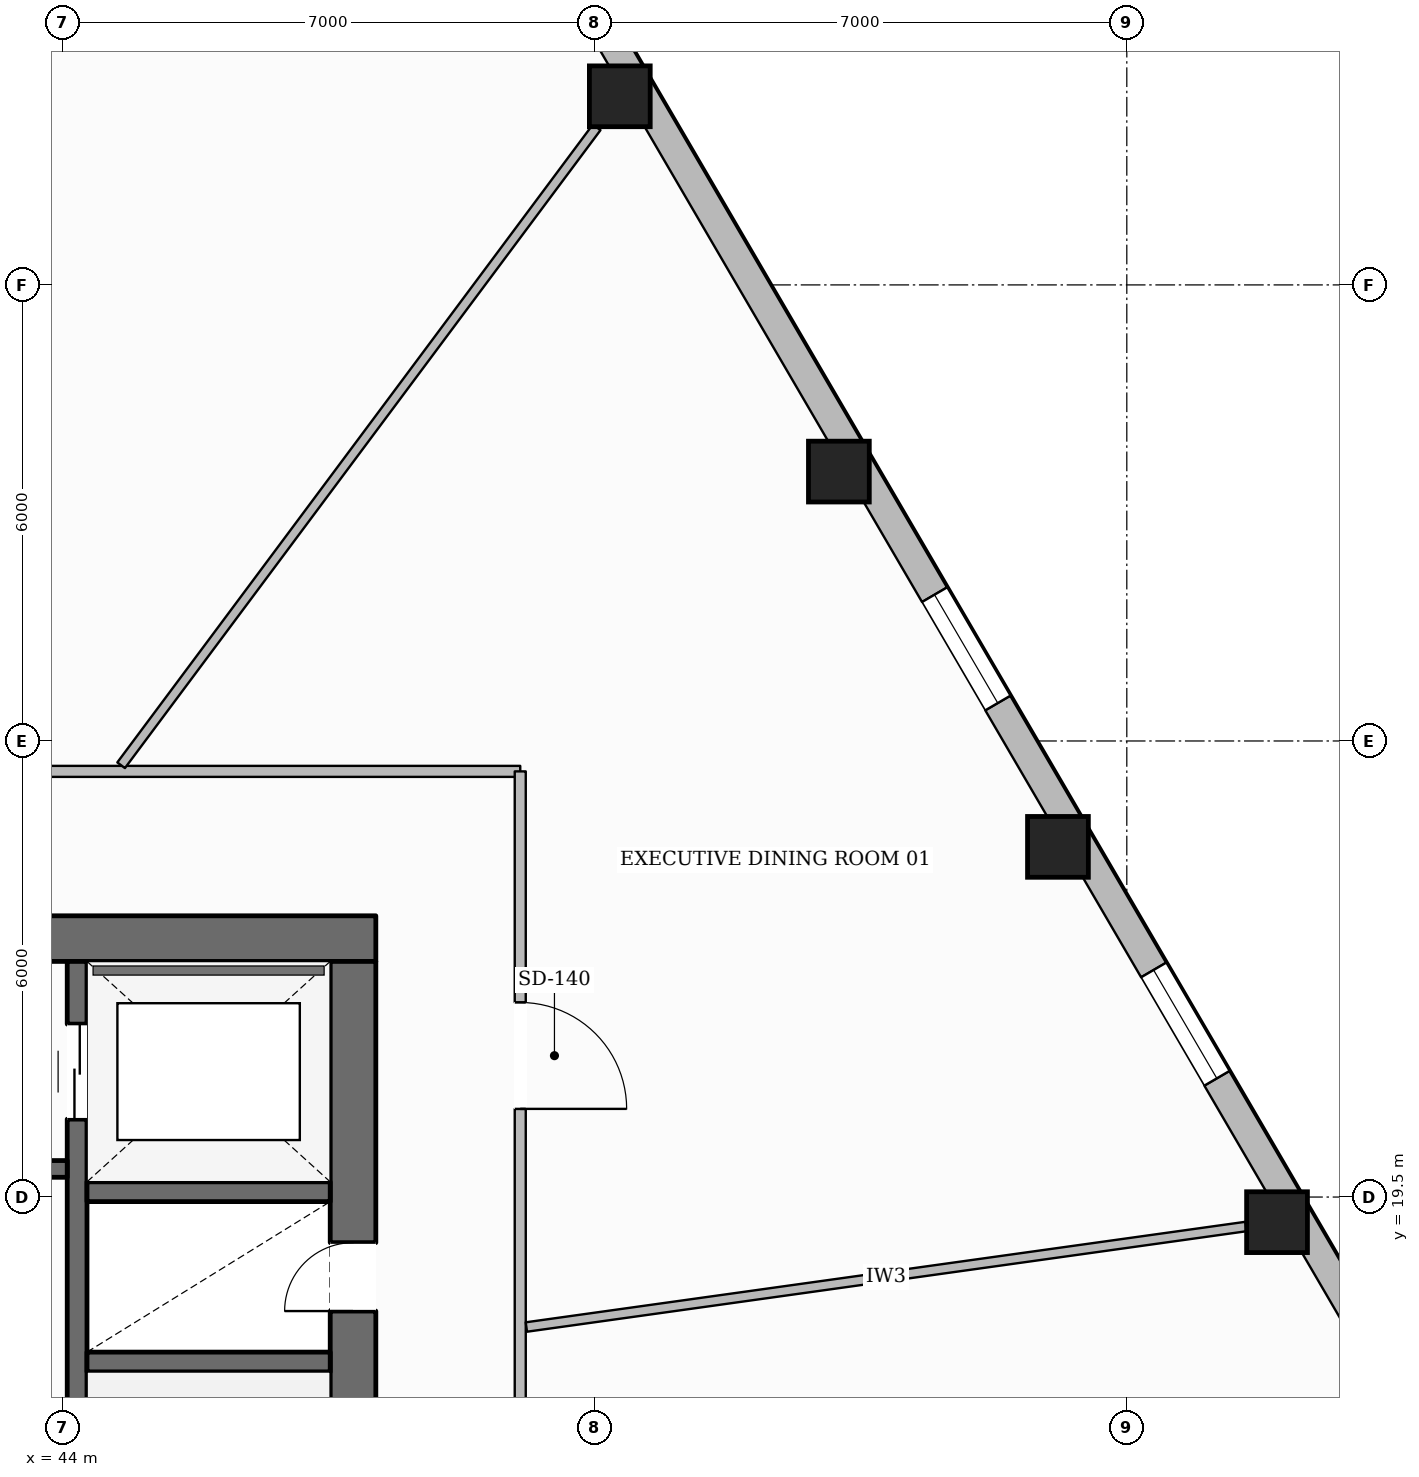
"""IFC4 building model, lengths in metres.
Left out: names, types, materials, properties, quantities, classifications, styles, units other than length and angle.
Written with IfcOpenShell. Run it as: python <this file> out.ifc"""

import sys

from ifc_helpers import new_model, si_unit, direction, frame, frame_2d, origin, origin_2d, place, context, subcontext, project, spatial, rectangle, hollow_rectangle, extrude, element, fill, save


model = new_model("IFC4")
c1 = context("Model", 3, precision=1e-05, world=origin(), true_north=direction((0.0, 1.0)))
c2 = subcontext(c1, "Body", "Model", "MODEL_VIEW")
j1 = project(units=[si_unit("LENGTHUNIT", "METRE"), si_unit("PLANEANGLEUNIT", "RADIAN")], contexts=[c1])
p1 = place(None, origin())
s1 = spatial("IfcSite", under=j1, at=p1, CompositionType="ELEMENT")
p2 = place(p1, origin())
s2 = spatial("IfcBuilding", under=s1, at=p2, CompositionType="ELEMENT")
p3 = place(p2, frame((0.0, 0.0, 48.35)))
s3 = spatial("IfcBuildingStorey", under=s2, at=p3, CompositionType="ELEMENT", Elevation=48.35)
p4 = place(p3, frame((27.88, 22.9, 0.0), z_axis=(0.0, 0.0, 1.0), x_axis=(1.0, 0.0, 0.0)))
e1 = element("IfcWall", 1, at=p4, inside=s3, PredefinedType="SOLIDWALL", context=c2, shape_type="SweptSolid", body=[
    extrude(rectangle(XDim=20.24, YDim=0.6, at=frame_2d((10.12, 0.0))), origin(), (0.0, 0.0, 1.0), 3.59),
])
p5 = place(p4, frame((6.395, 0.0, 0.0)))
e2 = element("IfcOpeningElement", 2, at=p5, cuts=e1, PredefinedType="OPENING", context=c2, shape_type="SweptSolid", body=[
    extrude(rectangle(XDim=1.05, YDim=2.15, at=frame_2d((0.525, 1.075))), frame((0.0, 0.31, 0.0), z_axis=(0.0, -1.0, 0.0), x_axis=(1.0, 0.0, 0.0)), (0.0, 0.0, 1.0), 0.62),
])
p6 = place(p4, frame((12.795, 0.0, 0.0)))
e3 = element("IfcOpeningElement", 3, at=p6, cuts=e1, PredefinedType="OPENING", context=c2, shape_type="SweptSolid", body=[
    extrude(rectangle(XDim=1.05, YDim=2.15, at=frame_2d((0.525, 1.075))), frame((0.0, 0.31, 0.0), z_axis=(0.0, -1.0, 0.0), x_axis=(1.0, 0.0, 0.0)), (0.0, 0.0, 1.0), 0.62),
])
p7 = place(p3, frame((47.82, 9.6, 0.0), z_axis=(0.0, 0.0, 1.0), x_axis=(0.0, 1.0, 0.0)))
e4 = element("IfcWall", 4, at=p7, inside=s3, PredefinedType="SOLIDWALL", context=c2, shape_type="SweptSolid", body=[
    extrude(rectangle(XDim=13.0, YDim=0.6, at=frame_2d((6.5, 0.0))), origin(), (0.0, 0.0, 1.0), 3.59),
])
p8 = place(p7, frame((0.2, 0.0, 0.0)))
e5 = element("IfcOpeningElement", 5, at=p8, cuts=e4, PredefinedType="OPENING", context=c2, shape_type="SweptSolid", body=[
    extrude(rectangle(XDim=1.1, YDim=2.15, at=frame_2d((0.55, 1.075))), frame((0.0, 0.31, 0.0), z_axis=(0.0, -1.0, 0.0), x_axis=(1.0, 0.0, 0.0)), (0.0, 0.0, 1.0), 0.62),
])
p9 = place(p7, frame((8.4, 0.0, 0.0)))
e6 = element("IfcOpeningElement", 6, at=p9, cuts=e4, PredefinedType="OPENING", context=c2, shape_type="SweptSolid", body=[
    extrude(rectangle(XDim=0.9, YDim=2.1, at=frame_2d((0.45, 1.05))), frame((0.0, 0.31, 0.0), z_axis=(0.0, -1.0, 0.0), x_axis=(1.0, 0.0, 0.0)), (0.0, 0.0, 1.0), 0.62),
])
p10 = place(p3, frame((44.19, 9.6, 0.0), z_axis=(0.0, 0.0, 1.0), x_axis=(0.0, 1.0, 0.0)))
e7 = element("IfcWall", 7, at=p10, inside=s3, PredefinedType="SHEAR", context=c2, shape_type="SweptSolid", body=[
    extrude(rectangle(XDim=13.0, YDim=0.26, at=frame_2d((6.5, 0.0))), origin(), (0.0, 0.0, 1.0), 3.59),
])
p11 = place(p10, frame((10.925, 0.0, 0.0)))
e8 = element("IfcOpeningElement", 8, at=p11, cuts=e7, PredefinedType="OPENING", context=c2, shape_type="SweptSolid", body=[
    extrude(rectangle(XDim=1.25, YDim=2.25, at=frame_2d((0.625, 1.125))), frame((0.0, 0.14, 0.0), z_axis=(0.0, -1.0, 0.0), x_axis=(1.0, 0.0, 0.0)), (0.0, 0.0, 1.0), 0.28),
])
for number, where, z_axis, x_axis in (
    (9, (44.32, 17.33, 0.0), (0.0, 0.0, 1.0), (1.0, 0.0, 0.0)),
    (10, (44.32, 19.57, 0.0), (0.0, 0.0, 1.0), (1.0, 0.0, 0.0)),
):
    element("IfcWall", number, at=place(p3, frame(where, z_axis=z_axis, x_axis=x_axis)), inside=s3, PredefinedType="SHEAR", context=c2, shape_type="SweptSolid", body=[
        extrude(rectangle(XDim=3.2, YDim=0.26, at=frame_2d((1.6, 0.0))), origin(), (0.0, 0.0, 1.0), 3.59),
    ])
p12 = place(p3, frame((31.94, 19.87, 0.0), z_axis=(0.0, 0.0, 1.0), x_axis=(1.0, 0.0, 0.0)))
e11 = element("IfcWall", 11, at=p12, inside=s3, PredefinedType="SOLIDWALL", context=c2, shape_type="SweptSolid", body=[
    extrude(rectangle(XDim=12.12, YDim=0.22, at=frame_2d((6.06, 0.0))), origin(), (0.0, 0.0, 1.0), 3.59),
])
p13 = place(p12, frame((6.3, 0.0, 0.0)))
e12 = element("IfcOpeningElement", 12, at=p13, cuts=e11, PredefinedType="OPENING", context=c2, shape_type="SweptSolid", body=[
    extrude(rectangle(XDim=1.1, YDim=2.15, at=frame_2d((0.55, 1.075))), frame((0.0, 0.12, 0.0), z_axis=(0.0, -1.0, 0.0), x_axis=(1.0, 0.0, 0.0)), (0.0, 0.0, 1.0), 0.24),
])
p14 = place(p12, frame((8.01, 0.0, 0.0)))
e13 = element("IfcOpeningElement", 13, at=p14, cuts=e11, PredefinedType="OPENING", context=c2, shape_type="SweptSolid", body=[
    extrude(rectangle(XDim=0.9, YDim=2.1, at=frame_2d((0.45, 1.05))), frame((0.0, 0.12, 0.0), z_axis=(0.0, -1.0, 0.0), x_axis=(1.0, 0.0, 0.0)), (0.0, 0.0, 1.0), 0.24),
])
p15 = place(p12, frame((10.21, 0.0, 0.0)))
e14 = element("IfcOpeningElement", 14, at=p15, cuts=e11, PredefinedType="OPENING", context=c2, shape_type="SweptSolid", body=[
    extrude(rectangle(XDim=0.9, YDim=2.1, at=frame_2d((0.45, 1.05))), frame((0.0, 0.12, 0.0), z_axis=(0.0, -1.0, 0.0), x_axis=(1.0, 0.0, 0.0)), (0.0, 0.0, 1.0), 0.24),
])
for number, where, z_axis, x_axis in (
    (15, (59.976, 19.169, 0.0), (0.0, 0.0, 1.0), (1.0, 0.0, 0.0)),
    (16, (57.094, 24.107, 0.0), (0.0, 0.0, 1.0), (1.0, 0.0, 0.0)),
    (17, (54.212, 29.044, 0.0), (0.0, 0.0, 1.0), (1.0, 0.0, 0.0)),
    (18, (51.33, 33.981, 0.0), (0.0, 0.0, 1.0), (1.0, 0.0, 0.0)),
):
    element("IfcColumn", number, at=place(p3, frame(where, z_axis=z_axis, x_axis=x_axis)), inside=s3, PredefinedType="COLUMN", context=c2, shape_type="SweptSolid", body=[
        extrude(hollow_rectangle(XDim=0.8, YDim=0.8, WallThickness=0.036, at=origin_2d()), origin(), (0.0, 0.0, 1.0), 3.59),
    ])
p16 = place(p3, frame((45.56, 44.402, 0.0), z_axis=(0.0, 0.0, 1.0), x_axis=(0.504140111044, -0.86362187816, 0.0)))
e19 = element("IfcWall", 19, at=p16, inside=s3, PredefinedType="STANDARD", context=c2, shape_type="SweptSolid", body=[
    extrude(rectangle(XDim=35.254, YDim=0.38, at=frame_2d((17.627, 0.0))), origin(), (0.0, 0.0, 1.0), 2.97),
])
p17 = place(p16, frame((31.093, 0.0, 0.65)))
e20 = element("IfcOpeningElement", 20, at=p17, cuts=e19, PredefinedType="OPENING", context=c2, shape_type="SweptSolid", body=[
    extrude(rectangle(XDim=1.65, YDim=1.75, at=frame_2d((0.825, 0.875))), frame((0.0, 0.2, 0.0), z_axis=(0.0, -1.0, 0.0), x_axis=(1.0, 0.0, 0.0)), (0.0, 0.0, 1.0), 0.4),
])
p18 = place(p16, frame((25.375, 0.0, 0.65)))
e21 = element("IfcOpeningElement", 21, at=p18, cuts=e19, PredefinedType="OPENING", context=c2, shape_type="SweptSolid", body=[
    extrude(rectangle(XDim=1.65, YDim=1.75, at=frame_2d((0.825, 0.875))), frame((0.0, 0.2, 0.0), z_axis=(0.0, -1.0, 0.0), x_axis=(1.0, 0.0, 0.0)), (0.0, 0.0, 1.0), 0.4),
])
p19 = place(p16, frame((19.658, 0.0, 0.65)))
e22 = element("IfcOpeningElement", 22, at=p19, cuts=e19, PredefinedType="OPENING", context=c2, shape_type="SweptSolid", body=[
    extrude(rectangle(XDim=1.65, YDim=1.75, at=frame_2d((0.825, 0.875))), frame((0.0, 0.2, 0.0), z_axis=(0.0, -1.0, 0.0), x_axis=(1.0, 0.0, 0.0)), (0.0, 0.0, 1.0), 0.4),
])
p20 = place(p16, frame((8.224, 0.0, 0.65)))
e23 = element("IfcOpeningElement", 23, at=p20, cuts=e19, PredefinedType="OPENING", context=c2, shape_type="SweptSolid", body=[
    extrude(rectangle(XDim=1.65, YDim=1.75, at=frame_2d((0.825, 0.875))), frame((0.0, 0.2, 0.0), z_axis=(0.0, -1.0, 0.0), x_axis=(1.0, 0.0, 0.0)), (0.0, 0.0, 1.0), 0.4),
])
p21 = place(p16, frame((2.507, 0.0, 0.65)))
e24 = element("IfcOpeningElement", 24, at=p21, cuts=e19, PredefinedType="OPENING", context=c2, shape_type="SweptSolid", body=[
    extrude(rectangle(XDim=1.65, YDim=1.75, at=frame_2d((0.825, 0.875))), frame((0.0, 0.2, 0.0), z_axis=(0.0, -1.0, 0.0), x_axis=(1.0, 0.0, 0.0)), (0.0, 0.0, 1.0), 0.4),
])
p22 = place(p3, frame((39.0, 25.1, 0.0), z_axis=(0.0, 0.0, 1.0), x_axis=(1.0, 0.0, 0.0)))
e25 = element("IfcWall", 25, at=p22, inside=s3, PredefinedType="PARTITIONING", context=c2, shape_type="SweptSolid", body=[
    extrude(rectangle(XDim=11.02, YDim=0.145, at=frame_2d((5.51, 0.0))), origin(), (0.0, 0.0, 1.0), 3.59),
])
p23 = place(p3, frame((50.02, 25.1, 0.0), z_axis=(0.0, 0.0, 1.0), x_axis=(0.0, -1.0, 0.0)))
e26 = element("IfcWall", 26, at=p23, inside=s3, PredefinedType="PARTITIONING", context=c2, shape_type="SweptSolid", body=[
    extrude(rectangle(XDim=16.0, YDim=0.145, at=frame_2d((8.0, 0.0))), origin(), (0.0, 0.0, 1.0), 3.278),
])
p24 = place(p23, frame((3.04, 0.0, 0.0)))
e27 = element("IfcOpeningElement", 27, at=p24, cuts=e26, PredefinedType="OPENING", context=c2, shape_type="SweptSolid", body=[
    extrude(rectangle(XDim=1.4, YDim=2.2, at=frame_2d((0.7, 1.1))), frame((0.0, 0.083, 0.0), z_axis=(0.0, -1.0, 0.0), x_axis=(1.0, 0.0, 0.0)), (0.0, 0.0, 1.0), 0.165),
])
p25 = place(p23, frame((10.869, 0.0, 0.0)))
e28 = element("IfcOpeningElement", 28, at=p25, cuts=e26, PredefinedType="OPENING", context=c2, shape_type="SweptSolid", body=[
    extrude(rectangle(XDim=1.4, YDim=2.2, at=frame_2d((0.7, 1.1))), frame((0.0, 0.083, 0.0), z_axis=(0.0, -1.0, 0.0), x_axis=(1.0, 0.0, 0.0)), (0.0, 0.0, 1.0), 0.165),
])
p26 = place(p3, frame((50.101, 17.79, 0.0), z_axis=(0.0, 0.0, 1.0), x_axis=(0.99038797962, 0.138317207262, 0.0)))
e29 = element("IfcWall", 29, at=p26, inside=s3, PredefinedType="PARTITIONING", context=c2, shape_type="SweptSolid", body=[
    extrude(rectangle(XDim=9.56, YDim=0.125, at=frame_2d((4.78, 0.0))), origin(), (0.0, 0.0, 1.0), 3.057),
])
p27 = place(p3, frame((44.769, 25.18, 0.0), z_axis=(0.0, 0.0, 1.0), x_axis=(0.597661555118, 0.801748505165, 0.0)))
e30 = element("IfcWall", 30, at=p27, inside=s3, PredefinedType="PARTITIONING", context=c2, shape_type="SweptSolid", body=[
    extrude(rectangle(XDim=10.469, YDim=0.125, at=frame_2d((5.234, 0.0))), origin(), (0.0, 0.0, 1.0), 3.057),
])
p28 = place(p18, origin())
e31 = element("IfcWindow", 31, at=p28, inside=s3, PartitioningType="SINGLE_PANEL", PredefinedType="WINDOW", context=c2, shape_type="SweptSolid", body=[
    extrude(rectangle(XDim=1.65, YDim=1.75, at=frame_2d((0.825, 0.875))), frame((0.0, 0.03, 0.0), z_axis=(0.0, -1.0, 0.0), x_axis=(1.0, 0.0, 0.0)), (0.0, 0.0, 1.0), 0.06),
])
fill(e21, e31)
p29 = place(p19, origin())
e32 = element("IfcWindow", 32, at=p29, inside=s3, PartitioningType="SINGLE_PANEL", PredefinedType="WINDOW", context=c2, shape_type="SweptSolid", body=[
    extrude(rectangle(XDim=1.65, YDim=1.75, at=frame_2d((0.825, 0.875))), frame((0.0, 0.03, 0.0), z_axis=(0.0, -1.0, 0.0), x_axis=(1.0, 0.0, 0.0)), (0.0, 0.0, 1.0), 0.06),
])
fill(e22, e32)
p30 = place(p9, origin())
e33 = element("IfcDoor", 33, at=p30, inside=s3, OperationType="SINGLE_SWING_LEFT", PredefinedType="DOOR", context=c2, shape_type="SweptSolid", body=[
    extrude(rectangle(XDim=0.9, YDim=2.1, at=frame_2d((0.45, 1.05))), frame((0.0, 0.025, 0.0), z_axis=(0.0, -1.0, 0.0), x_axis=(1.0, 0.0, 0.0)), (0.0, 0.0, 1.0), 0.05),
])
fill(e6, e33)
p31 = place(p11, origin())
e34 = element("IfcDoor", 34, at=p31, inside=s3, OperationType="DOUBLE_DOOR_SLIDING", PredefinedType="DOOR", context=c2, shape_type="SweptSolid", body=[
    extrude(rectangle(XDim=1.25, YDim=2.25, at=frame_2d((0.625, 1.125))), frame((0.0, 0.025, 0.0), z_axis=(0.0, -1.0, 0.0), x_axis=(1.0, 0.0, 0.0)), (0.0, 0.0, 1.0), 0.05),
])
fill(e8, e34)
p32 = place(p24, origin())
e35 = element("IfcDoor", 35, at=p32, inside=s3, OperationType="SINGLE_SWING_RIGHT", PredefinedType="DOOR", context=c2, shape_type="SweptSolid", body=[
    extrude(rectangle(XDim=1.4, YDim=2.2, at=frame_2d((0.7, 1.1))), frame((0.0, 0.025, 0.0), z_axis=(0.0, -1.0, 0.0), x_axis=(1.0, 0.0, 0.0)), (0.0, 0.0, 1.0), 0.05),
])
fill(e27, e35)
save(model, sys.argv[1])
